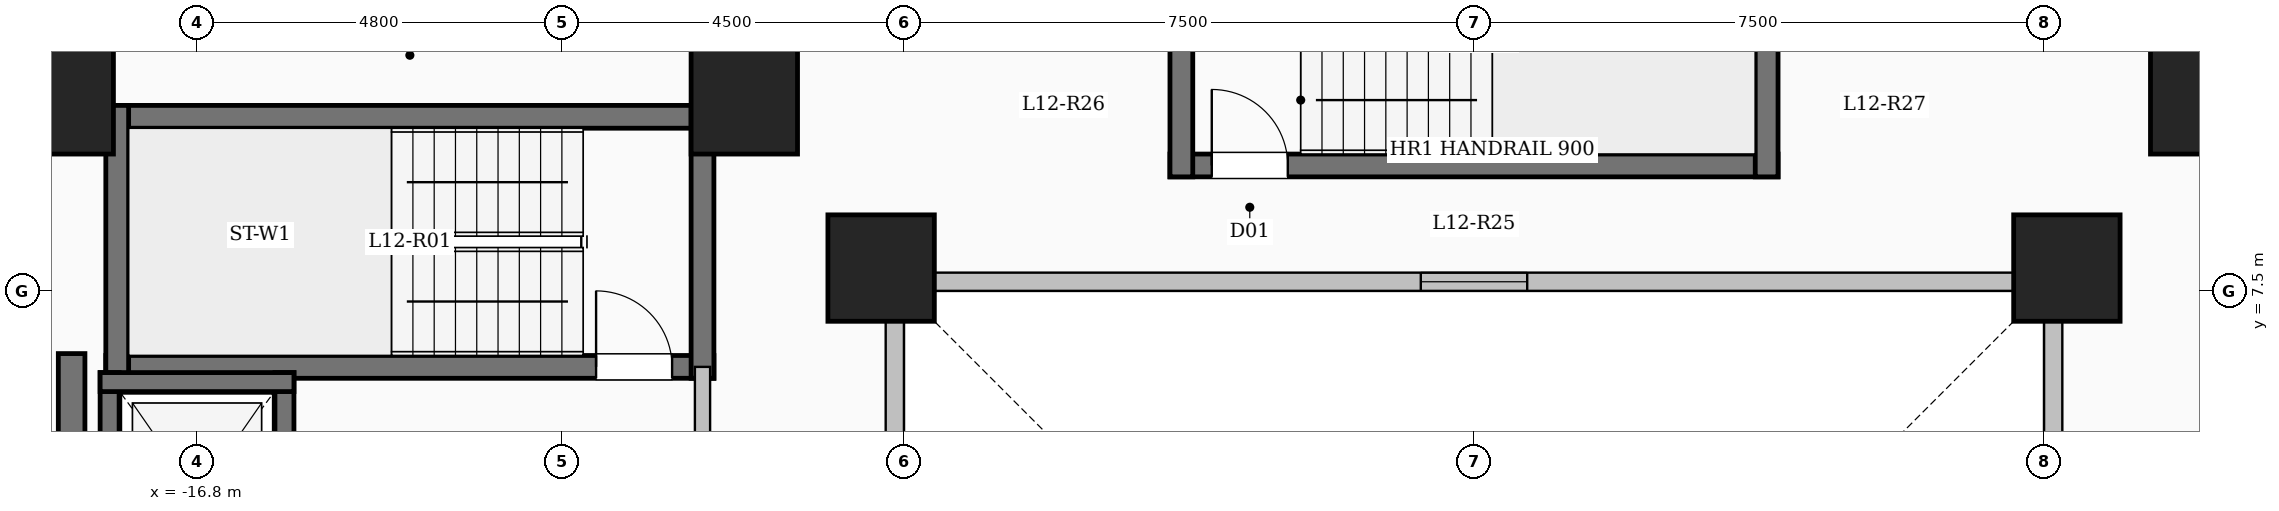
"""IFC4 building model, lengths in metres.
Left out: names, types, materials, properties, quantities, classifications, styles, units other than length and angle.
Written with IfcOpenShell. Run it as: python <this file> out.ifc"""

import sys

from ifc_helpers import new_model, si_unit, direction, frame, frame_2d, origin, origin_2d, place, context, subcontext, project, spatial, rectangle, extrude, element, fill, save


model = new_model("IFC4")
c1 = context("Model", 3, precision=1e-05, world=origin(), true_north=direction((0.0, 1.0)))
c2 = subcontext(c1, "Body", "Model", "MODEL_VIEW")
j1 = project(units=[si_unit("LENGTHUNIT", "METRE"), si_unit("PLANEANGLEUNIT", "RADIAN")], contexts=[c1])
p1 = place(None, origin())
s1 = spatial("IfcSite", under=j1, at=p1, CompositionType="ELEMENT")
p2 = place(p1, origin())
s2 = spatial("IfcBuilding", under=s1, at=p2, CompositionType="ELEMENT")
p3 = place(p2, frame((0.0, 0.0, 47.45)))
s3 = spatial("IfcBuildingStorey", under=s2, at=p3, CompositionType="ELEMENT", Elevation=47.45)
for number, where, z_axis, x_axis in (
    (1, (-7.8, 7.8, 0.0), (0.0, 0.0, 1.0), (1.0, 0.0, 0.0)),
    (2, (7.8, 7.8, 0.0), (0.0, 0.0, 1.0), (1.0, 0.0, 0.0)),
    (3, (-9.6, 10.0, 0.0), (0.0, 0.0, 1.0), (1.0, 0.0, 0.0)),
    (4, (9.6, 10.0, 0.0), (0.0, 0.0, 1.0), (1.0, 0.0, 0.0)),
    (5, (-18.6, 10.0, 0.0), (0.0, 0.0, 1.0), (1.0, 0.0, 0.0)),
):
    element("IfcColumn", number, at=place(p3, frame(where, z_axis=z_axis, x_axis=x_axis)), inside=s3, PredefinedType="COLUMN", context=c2, shape_type="SweptSolid", body=[
        extrude(rectangle(XDim=1.4, YDim=1.4, at=origin_2d()), origin(), (0.0, 0.0, 1.0), 3.35),
    ])
p4 = place(p3, frame((7.62, -7.62, 0.0), z_axis=(0.0, 0.0, 1.0), x_axis=(0.0, 1.0, 0.0)))
e6 = element("IfcWall", 6, at=p4, inside=s3, PredefinedType="SOLIDWALL", context=c2, shape_type="SweptSolid", body=[
    extrude(rectangle(XDim=15.24, YDim=0.24, at=frame_2d((7.62, 0.0))), origin(), (0.0, 0.0, 1.0), 3.1),
])
p5 = place(p4, frame((6.92, 0.0, 0.95)))
e7 = element("IfcOpeningElement", 7, at=p5, cuts=e6, PredefinedType="OPENING", context=c2, shape_type="SweptSolid", body=[
    extrude(rectangle(XDim=1.4, YDim=1.5, at=frame_2d((0.7, 0.75))), frame((0.0, 0.13, 0.0), z_axis=(0.0, -1.0, 0.0), x_axis=(1.0, 0.0, 0.0)), (0.0, 0.0, 1.0), 0.26),
])
p6 = place(p3, frame((7.62, 7.62, 0.0), z_axis=(0.0, 0.0, 1.0), x_axis=(-1.0, 0.0, 0.0)))
e8 = element("IfcWall", 8, at=p6, inside=s3, PredefinedType="SOLIDWALL", context=c2, shape_type="SweptSolid", body=[
    extrude(rectangle(XDim=15.24, YDim=0.24, at=frame_2d((7.62, 0.0))), origin(), (0.0, 0.0, 1.0), 3.1),
])
p7 = place(p6, frame((6.92, 0.0, 0.95)))
e9 = element("IfcOpeningElement", 9, at=p7, cuts=e8, PredefinedType="OPENING", context=c2, shape_type="SweptSolid", body=[
    extrude(rectangle(XDim=1.4, YDim=1.5, at=frame_2d((0.7, 0.75))), frame((0.0, 0.13, 0.0), z_axis=(0.0, -1.0, 0.0), x_axis=(1.0, 0.0, 0.0)), (0.0, 0.0, 1.0), 0.26),
])
p8 = place(p3, frame((-7.62, 7.62, 0.0), z_axis=(0.0, 0.0, 1.0), x_axis=(0.0, -1.0, 0.0)))
e10 = element("IfcWall", 10, at=p8, inside=s3, PredefinedType="SOLIDWALL", context=c2, shape_type="SweptSolid", body=[
    extrude(rectangle(XDim=15.24, YDim=0.24, at=frame_2d((7.62, 0.0))), origin(), (0.0, 0.0, 1.0), 3.1),
])
p9 = place(p8, frame((6.92, 0.0, 0.95)))
e11 = element("IfcOpeningElement", 11, at=p9, cuts=e10, PredefinedType="OPENING", context=c2, shape_type="SweptSolid", body=[
    extrude(rectangle(XDim=1.4, YDim=1.5, at=frame_2d((0.7, 0.75))), frame((0.0, 0.13, 0.0), z_axis=(0.0, -1.0, 0.0), x_axis=(1.0, 0.0, 0.0)), (0.0, 0.0, 1.0), 0.26),
])
p10 = place(p3, frame((-18.0, 9.79, 0.0), z_axis=(0.0, 0.0, 1.0), x_axis=(1.0, 0.0, 0.0)))
e12 = element("IfcWall", 12, at=p10, inside=s3, PredefinedType="SHEAR", context=c2, shape_type="SweptSolid", body=[
    extrude(rectangle(XDim=8.0, YDim=0.3, at=frame_2d((4.0, 0.0))), origin(), (0.0, 0.0, 1.0), 3.35),
])
p11 = place(p3, frame((-18.0, 6.5, 0.0), z_axis=(0.0, 0.0, 1.0), x_axis=(1.0, 0.0, 0.0)))
e13 = element("IfcWall", 13, at=p11, inside=s3, PredefinedType="SHEAR", context=c2, shape_type="SweptSolid", body=[
    extrude(rectangle(XDim=8.0, YDim=0.3, at=frame_2d((4.0, 0.0))), origin(), (0.0, 0.0, 1.0), 3.35),
])
p12 = place(p11, frame((6.45, 0.0, 0.0)))
e14 = element("IfcOpeningElement", 14, at=p12, cuts=e13, PredefinedType="OPENING", context=c2, shape_type="SweptSolid", body=[
    extrude(rectangle(XDim=1.0, YDim=2.15, at=frame_2d((0.5, 1.075))), frame((0.0, 0.16, 0.0), z_axis=(0.0, -1.0, 0.0), x_axis=(1.0, 0.0, 0.0)), (0.0, 0.0, 1.0), 0.32),
])
for number, where, z_axis, x_axis in (
    (15, (-17.85, 6.35, 0.0), (0.0, 0.0, 1.0), (0.0, 1.0, 0.0)),
    (16, (-10.15, 6.35, 0.0), (0.0, 0.0, 1.0), (0.0, 1.0, 0.0)),
):
    element("IfcWall", number, at=place(p3, frame(where, z_axis=z_axis, x_axis=x_axis)), inside=s3, PredefinedType="SHEAR", context=c2, shape_type="SweptSolid", body=[
        extrude(rectangle(XDim=3.59, YDim=0.3, at=frame_2d((1.795, 0.0))), origin(), (0.0, 0.0, 1.0), 3.35),
    ])
p13 = place(p3, frame((-4.0, 9.15, 0.0), z_axis=(0.0, 0.0, 1.0), x_axis=(1.0, 0.0, 0.0)))
e17 = element("IfcWall", 17, at=p13, inside=s3, PredefinedType="SHEAR", context=c2, shape_type="SweptSolid", body=[
    extrude(rectangle(XDim=8.0, YDim=0.3, at=frame_2d((4.0, 0.0))), origin(), (0.0, 0.0, 1.0), 3.35),
])
p14 = place(p13, frame((0.55, 0.0, 0.0)))
e18 = element("IfcOpeningElement", 18, at=p14, cuts=e17, PredefinedType="OPENING", context=c2, shape_type="SweptSolid", body=[
    extrude(rectangle(XDim=1.0, YDim=2.15, at=frame_2d((0.5, 1.075))), frame((0.0, 0.16, 0.0), z_axis=(0.0, -1.0, 0.0), x_axis=(1.0, 0.0, 0.0)), (0.0, 0.0, 1.0), 0.32),
])
for number, where, z_axis, x_axis in (
    (19, (-3.85, 9.0, 0.0), (0.0, 0.0, 1.0), (0.0, 1.0, 0.0)),
    (20, (3.85, 9.0, 0.0), (0.0, 0.0, 1.0), (0.0, 1.0, 0.0)),
):
    element("IfcWall", number, at=place(p3, frame(where, z_axis=z_axis, x_axis=x_axis)), inside=s3, PredefinedType="SHEAR", context=c2, shape_type="SweptSolid", body=[
        extrude(rectangle(XDim=3.59, YDim=0.3, at=frame_2d((1.795, 0.0))), origin(), (0.0, 0.0, 1.0), 3.35),
    ])
p15 = place(p3, frame((-10.15, 3.25, 0.0), z_axis=(0.0, 0.0, 1.0), x_axis=(0.0, 1.0, 0.0)))
e21 = element("IfcWall", 21, at=p15, inside=s3, PredefinedType="SOLIDWALL", context=c2, shape_type="SweptSolid", body=[
    extrude(rectangle(XDim=3.25, YDim=0.2, at=frame_2d((1.625, 0.0))), origin(), (0.0, 0.0, 1.0), 3.1),
])
p16 = place(p15, frame((1.1, 0.0, 0.0)))
e22 = element("IfcOpeningElement", 22, at=p16, cuts=e21, PredefinedType="OPENING", context=c2, shape_type="SweptSolid", body=[
    extrude(rectangle(XDim=1.02, YDim=2.15, at=frame_2d((0.51, 1.075))), frame((0.0, 0.11, 0.0), z_axis=(0.0, -1.0, 0.0), x_axis=(1.0, 0.0, 0.0)), (0.0, 0.0, 1.0), 0.22),
])
p17 = place(p3, frame((-17.95, 3.175, 0.0), z_axis=(0.0, 0.0, 1.0), x_axis=(0.0, 1.0, 0.0)))
e23 = element("IfcWall", 23, at=p17, inside=s3, PredefinedType="SHEAR", context=c2, shape_type="SweptSolid", body=[
    extrude(rectangle(XDim=3.25, YDim=0.25, at=frame_2d((1.625, 0.0))), origin(), (0.0, 0.0, 1.0), 3.35),
])
p18 = place(p3, frame((-15.65, 3.175, 0.0), z_axis=(0.0, 0.0, 1.0), x_axis=(0.0, 1.0, 0.0)))
e24 = element("IfcWall", 24, at=p18, inside=s3, PredefinedType="SHEAR", context=c2, shape_type="SweptSolid", body=[
    extrude(rectangle(XDim=3.25, YDim=0.25, at=frame_2d((1.625, 0.0))), origin(), (0.0, 0.0, 1.0), 3.35),
])
p19 = place(p18, frame((1.075, 0.0, 0.0)))
e25 = element("IfcOpeningElement", 25, at=p19, cuts=e24, PredefinedType="OPENING", context=c2, shape_type="SweptSolid", body=[
    extrude(rectangle(XDim=1.1, YDim=2.15, at=frame_2d((0.55, 1.075))), frame((0.0, 0.135, 0.0), z_axis=(0.0, -1.0, 0.0), x_axis=(1.0, 0.0, 0.0)), (0.0, 0.0, 1.0), 0.27),
])
p20 = place(p3, frame((-18.075, 6.3, 0.0), z_axis=(0.0, 0.0, 1.0), x_axis=(1.0, 0.0, 0.0)))
e26 = element("IfcWall", 26, at=p20, inside=s3, PredefinedType="SHEAR", context=c2, shape_type="SweptSolid", body=[
    extrude(rectangle(XDim=2.55, YDim=0.25, at=frame_2d((1.275, 0.0))), origin(), (0.0, 0.0, 1.0), 3.35),
])
p21 = place(p3, frame((-18.45, -7.375, 0.0), z_axis=(0.0, 0.0, 1.0), x_axis=(0.0, 1.0, 0.0)))
e27 = element("IfcWall", 27, at=p21, inside=s3, PredefinedType="SHEAR", context=c2, shape_type="SweptSolid", body=[
    extrude(rectangle(XDim=14.05, YDim=0.35, at=frame_2d((7.025, 0.0))), origin(), (0.0, 0.0, 1.0), 3.35),
])
p22 = place(p7, origin())
e28 = element("IfcWindow", 28, at=p22, inside=s3, PartitioningType="SINGLE_PANEL", PredefinedType="WINDOW", context=c2, shape_type="SweptSolid", body=[
    extrude(rectangle(XDim=1.4, YDim=1.5, at=frame_2d((0.7, 0.75))), frame((0.0, 0.03, 0.0), z_axis=(0.0, -1.0, 0.0), x_axis=(1.0, 0.0, 0.0)), (0.0, 0.0, 1.0), 0.06),
])
fill(e9, e28)
p23 = place(p12, origin())
e29 = element("IfcDoor", 29, at=p23, inside=s3, OperationType="SINGLE_SWING_LEFT", PredefinedType="DOOR", context=c2, shape_type="SweptSolid", body=[
    extrude(rectangle(XDim=1.0, YDim=2.15, at=frame_2d((0.5, 1.075))), frame((0.0, 0.025, 0.0), z_axis=(0.0, -1.0, 0.0), x_axis=(1.0, 0.0, 0.0)), (0.0, 0.0, 1.0), 0.05),
])
fill(e14, e29)
p24 = place(p14, origin())
e30 = element("IfcDoor", 30, at=p24, inside=s3, OperationType="SINGLE_SWING_LEFT", PredefinedType="DOOR", context=c2, shape_type="SweptSolid", body=[
    extrude(rectangle(XDim=1.0, YDim=2.15, at=frame_2d((0.5, 1.075))), frame((0.0, 0.025, 0.0), z_axis=(0.0, -1.0, 0.0), x_axis=(1.0, 0.0, 0.0)), (0.0, 0.0, 1.0), 0.05),
])
fill(e18, e30)
save(model, sys.argv[1])
